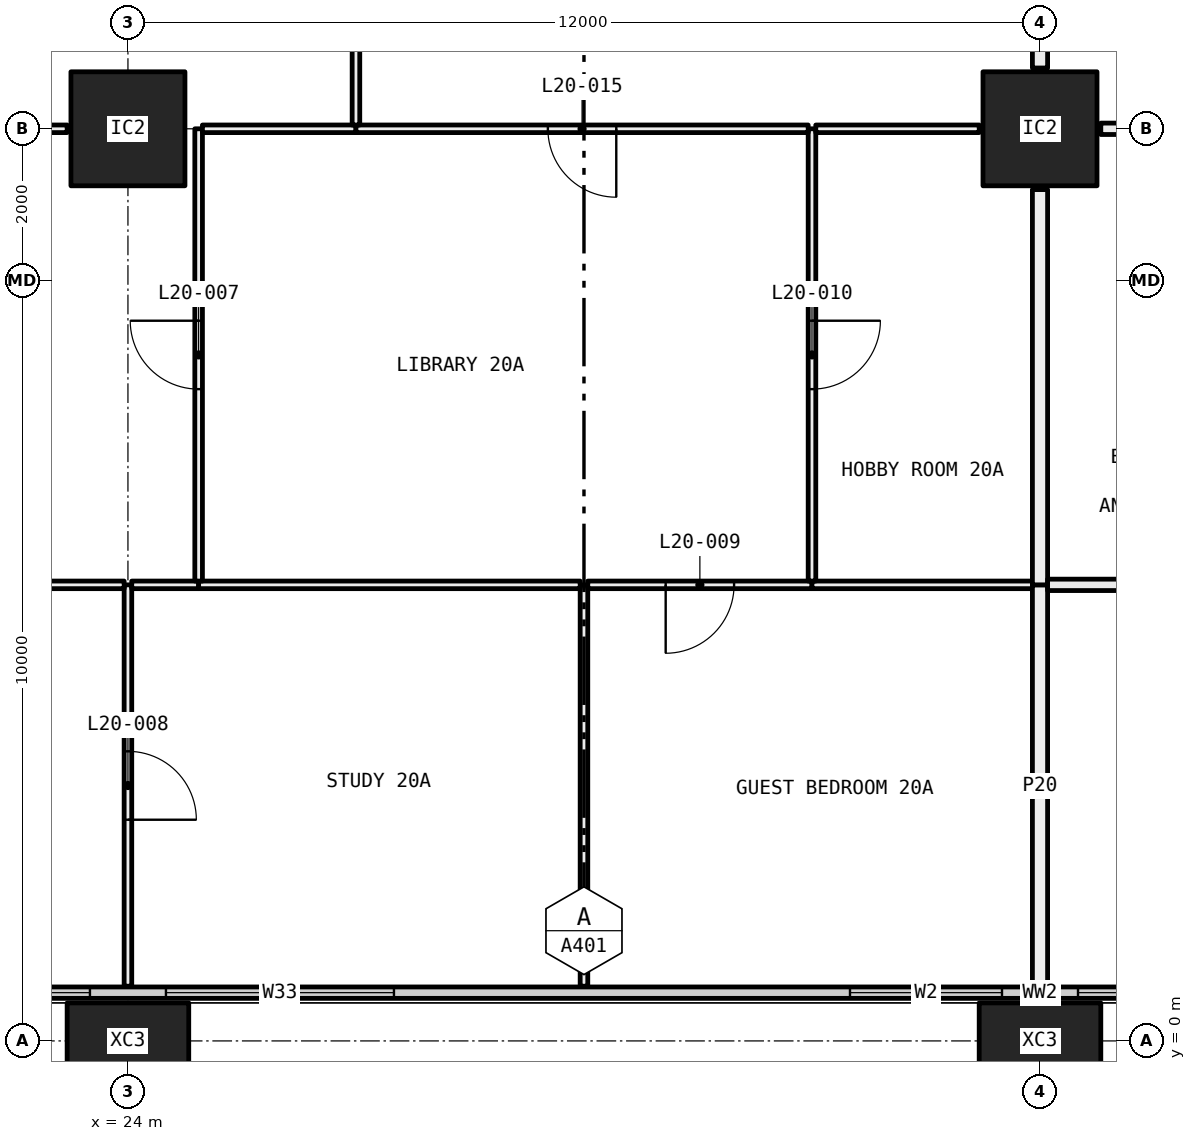
"""IFC4 building model, lengths in metres.
Left out: names, types, materials, properties, quantities, classifications, styles, units other than length and angle.
Written with IfcOpenShell. Run it as: python <this file> out.ifc"""

import sys

from ifc_helpers import new_model, si_unit, direction, frame, frame_2d, origin, origin_2d, place, context, subcontext, project, spatial, rectangle, hollow_rectangle, extrude, element, fill, save


model = new_model("IFC4")
c1 = context("Model", 3, precision=1e-05, world=origin(), true_north=direction((0.0, 1.0)))
c2 = subcontext(c1, "Body", "Model", "MODEL_VIEW")
j1 = project(units=[si_unit("LENGTHUNIT", "METRE"), si_unit("PLANEANGLEUNIT", "RADIAN")], contexts=[c1])
p1 = place(None, origin())
s1 = spatial("IfcSite", under=j1, at=p1, CompositionType="ELEMENT")
p2 = place(p1, origin())
s2 = spatial("IfcBuilding", under=s1, at=p2, CompositionType="ELEMENT")
p3 = place(p2, frame((0.0, 0.0, 81.75)))
s3 = spatial("IfcBuildingStorey", under=s2, at=p3, CompositionType="ELEMENT", Elevation=81.75)
p4 = place(p3, frame((24.0, 0.0, -0.4), z_axis=(0.0, 0.0, 1.0), x_axis=(1.0, 0.0, 0.0)))
e1 = element("IfcColumn", 1, at=p4, inside=s3, PredefinedType="COLUMN", context=c2, shape_type="SweptSolid", body=[
    extrude(hollow_rectangle(XDim=1.6, YDim=1.0, WallThickness=0.065, at=origin_2d()), origin(), (0.0, 0.0, 1.0), 3.45),
])
p5 = place(p3, frame((24.0, 12.0, 0.0), z_axis=(0.0, 0.0, 1.0), x_axis=(1.0, 0.0, 0.0)))
e2 = element("IfcColumn", 2, at=p5, inside=s3, PredefinedType="COLUMN", context=c2, shape_type="SweptSolid", body=[
    extrude(hollow_rectangle(XDim=1.5, YDim=1.5, WallThickness=0.065, at=origin_2d()), origin(), (0.0, 0.0, 1.0), 3.05),
])
p6 = place(p3, frame((36.0, 0.0, -0.4), z_axis=(0.0, 0.0, 1.0), x_axis=(1.0, 0.0, 0.0)))
e3 = element("IfcColumn", 3, at=p6, inside=s3, PredefinedType="COLUMN", context=c2, shape_type="SweptSolid", body=[
    extrude(hollow_rectangle(XDim=1.6, YDim=1.0, WallThickness=0.065, at=origin_2d()), origin(), (0.0, 0.0, 1.0), 3.45),
])
p7 = place(p3, frame((36.0, 12.0, 0.0), z_axis=(0.0, 0.0, 1.0), x_axis=(1.0, 0.0, 0.0)))
e4 = element("IfcColumn", 4, at=p7, inside=s3, PredefinedType="COLUMN", context=c2, shape_type="SweptSolid", body=[
    extrude(hollow_rectangle(XDim=1.5, YDim=1.5, WallThickness=0.065, at=origin_2d()), origin(), (0.0, 0.0, 1.0), 3.05),
])
p8 = place(p3, frame((6.56, 0.635, 0.0), z_axis=(0.0, 0.0, 1.0), x_axis=(1.0, 0.0, 0.0)))
e5 = element("IfcWall", 5, at=p8, inside=s3, PredefinedType="ELEMENTEDWALL", context=c2, shape_type="SweptSolid", body=[
    extrude(rectangle(XDim=58.88, YDim=0.15, at=frame_2d((29.44, 0.0))), origin(), (0.0, 0.0, 1.0), 3.05),
])
p9 = place(p8, frame((0.44, 0.0, 0.45)))
e6 = element("IfcOpeningElement", 6, at=p9, cuts=e5, PredefinedType="OPENING", context=c2, shape_type="SweptSolid", body=[
    extrude(rectangle(XDim=4.5, YDim=2.55, at=frame_2d((2.25, 1.275))), frame((0.0, 0.085, 0.0), z_axis=(0.0, -1.0, 0.0), x_axis=(1.0, 0.0, 0.0)), (0.0, 0.0, 1.0), 0.17),
])
p10 = place(p8, frame((5.94, 0.0, 0.45)))
e7 = element("IfcOpeningElement", 7, at=p10, cuts=e5, PredefinedType="OPENING", context=c2, shape_type="SweptSolid", body=[
    extrude(rectangle(XDim=3.0, YDim=2.55, at=frame_2d((1.5, 1.275))), frame((0.0, 0.085, 0.0), z_axis=(0.0, -1.0, 0.0), x_axis=(1.0, 0.0, 0.0)), (0.0, 0.0, 1.0), 0.17),
])
p11 = place(p8, frame((13.94, 0.0, 0.45)))
e8 = element("IfcOpeningElement", 8, at=p11, cuts=e5, PredefinedType="OPENING", context=c2, shape_type="SweptSolid", body=[
    extrude(rectangle(XDim=3.0, YDim=2.55, at=frame_2d((1.5, 1.275))), frame((0.0, 0.085, 0.0), z_axis=(0.0, -1.0, 0.0), x_axis=(1.0, 0.0, 0.0)), (0.0, 0.0, 1.0), 0.17),
])
p12 = place(p8, frame((17.94, 0.0, 0.45)))
e9 = element("IfcOpeningElement", 9, at=p12, cuts=e5, PredefinedType="OPENING", context=c2, shape_type="SweptSolid", body=[
    extrude(rectangle(XDim=3.0, YDim=2.55, at=frame_2d((1.5, 1.275))), frame((0.0, 0.085, 0.0), z_axis=(0.0, -1.0, 0.0), x_axis=(1.0, 0.0, 0.0)), (0.0, 0.0, 1.0), 0.17),
])
p13 = place(p8, frame((26.94, 0.0, 0.45)))
e10 = element("IfcOpeningElement", 10, at=p13, cuts=e5, PredefinedType="OPENING", context=c2, shape_type="SweptSolid", body=[
    extrude(rectangle(XDim=2.0, YDim=2.55, at=frame_2d((1.0, 1.275))), frame((0.0, 0.085, 0.0), z_axis=(0.0, -1.0, 0.0), x_axis=(1.0, 0.0, 0.0)), (0.0, 0.0, 1.0), 0.17),
])
p14 = place(p8, frame((29.94, 0.0, 0.45)))
e11 = element("IfcOpeningElement", 11, at=p14, cuts=e5, PredefinedType="OPENING", context=c2, shape_type="SweptSolid", body=[
    extrude(rectangle(XDim=3.0, YDim=2.55, at=frame_2d((1.5, 1.275))), frame((0.0, 0.085, 0.0), z_axis=(0.0, -1.0, 0.0), x_axis=(1.0, 0.0, 0.0)), (0.0, 0.0, 1.0), 0.17),
])
p15 = place(p8, frame((37.94, 0.0, 0.45)))
e12 = element("IfcOpeningElement", 12, at=p15, cuts=e5, PredefinedType="OPENING", context=c2, shape_type="SweptSolid", body=[
    extrude(rectangle(XDim=3.0, YDim=2.55, at=frame_2d((1.5, 1.275))), frame((0.0, 0.085, 0.0), z_axis=(0.0, -1.0, 0.0), x_axis=(1.0, 0.0, 0.0)), (0.0, 0.0, 1.0), 0.17),
])
p16 = place(p8, frame((41.94, 0.0, 0.45)))
e13 = element("IfcOpeningElement", 13, at=p16, cuts=e5, PredefinedType="OPENING", context=c2, shape_type="SweptSolid", body=[
    extrude(rectangle(XDim=3.0, YDim=2.55, at=frame_2d((1.5, 1.275))), frame((0.0, 0.085, 0.0), z_axis=(0.0, -1.0, 0.0), x_axis=(1.0, 0.0, 0.0)), (0.0, 0.0, 1.0), 0.17),
])
p17 = place(p8, frame((50.94, 0.0, 0.45)))
e14 = element("IfcOpeningElement", 14, at=p17, cuts=e5, PredefinedType="OPENING", context=c2, shape_type="SweptSolid", body=[
    extrude(rectangle(XDim=2.0, YDim=2.55, at=frame_2d((1.0, 1.275))), frame((0.0, 0.085, 0.0), z_axis=(0.0, -1.0, 0.0), x_axis=(1.0, 0.0, 0.0)), (0.0, 0.0, 1.0), 0.17),
])
p18 = place(p8, frame((53.94, 0.0, 0.45)))
e15 = element("IfcOpeningElement", 15, at=p18, cuts=e5, PredefinedType="OPENING", context=c2, shape_type="SweptSolid", body=[
    extrude(rectangle(XDim=4.5, YDim=2.55, at=frame_2d((2.25, 1.275))), frame((0.0, 0.085, 0.0), z_axis=(0.0, -1.0, 0.0), x_axis=(1.0, 0.0, 0.0)), (0.0, 0.0, 1.0), 0.17),
])
p19 = place(p3, frame((24.0, 0.72, 0.0), z_axis=(0.0, 0.0, 1.0), x_axis=(0.0, 1.0, 0.0)))
e16 = element("IfcWall", 16, at=p19, inside=s3, PredefinedType="PARTITIONING", context=c2, shape_type="SweptSolid", body=[
    extrude(rectangle(XDim=5.28, YDim=0.1, at=frame_2d((2.64, 0.0))), origin(), (0.0, 0.0, 1.0), 2.45),
])
p20 = place(p19, frame((2.19, 0.0, 0.0)))
e17 = element("IfcOpeningElement", 17, at=p20, cuts=e16, PredefinedType="OPENING", context=c2, shape_type="SweptSolid", body=[
    extrude(rectangle(XDim=0.9, YDim=2.1, at=frame_2d((0.45, 1.05))), frame((0.0, 0.06, 0.0), z_axis=(0.0, -1.0, 0.0), x_axis=(1.0, 0.0, 0.0)), (0.0, 0.0, 1.0), 0.12),
])
p21 = place(p3, frame((23.95, 6.0, 0.0), z_axis=(0.0, 0.0, 1.0), x_axis=(-1.0, 0.0, 0.0)))
e18 = element("IfcWall", 18, at=p21, inside=s3, PredefinedType="PARTITIONING", context=c2, shape_type="SweptSolid", body=[
    extrude(rectangle(XDim=7.09, YDim=0.1, at=frame_2d((3.545, 0.0))), origin(), (0.0, 0.0, 1.0), 2.45),
])
p22 = place(p3, frame((30.0, 0.72, 0.0), z_axis=(0.0, 0.0, 1.0), x_axis=(0.0, 1.0, 0.0)))
e19 = element("IfcWall", 19, at=p22, inside=s3, PredefinedType="PARTITIONING", context=c2, shape_type="SweptSolid", body=[
    extrude(rectangle(XDim=5.28, YDim=0.1, at=frame_2d((2.64, 0.0))), origin(), (0.0, 0.0, 1.0), 3.05),
])
p23 = place(p3, frame((24.93, 6.0, 0.0), z_axis=(0.0, 0.0, 1.0), x_axis=(-1.0, 0.0, 0.0)))
e20 = element("IfcWall", 20, at=p23, inside=s3, PredefinedType="PARTITIONING", context=c2, shape_type="SweptSolid", body=[
    extrude(rectangle(XDim=0.88, YDim=0.1, at=frame_2d((0.44, 0.0))), origin(), (0.0, 0.0, 1.0), 2.45),
])
p24 = place(p3, frame((29.95, 6.0, 0.0), z_axis=(0.0, 0.0, 1.0), x_axis=(-1.0, 0.0, 0.0)))
e21 = element("IfcWall", 21, at=p24, inside=s3, PredefinedType="PARTITIONING", context=c2, shape_type="SweptSolid", body=[
    extrude(rectangle(XDim=5.02, YDim=0.1, at=frame_2d((2.51, 0.0))), origin(), (0.0, 0.0, 1.0), 3.05),
])
p25 = place(p3, frame((33.0, 6.0, 0.0), z_axis=(0.0, 0.0, 1.0), x_axis=(-1.0, 0.0, 0.0)))
e22 = element("IfcWall", 22, at=p25, inside=s3, PredefinedType="PARTITIONING", context=c2, shape_type="SweptSolid", body=[
    extrude(rectangle(XDim=2.95, YDim=0.1, at=frame_2d((1.475, 0.0))), origin(), (0.0, 0.0, 1.0), 3.05),
])
p26 = place(p25, frame((1.025, 0.0, 0.0)))
e23 = element("IfcOpeningElement", 23, at=p26, cuts=e22, PredefinedType="OPENING", context=c2, shape_type="SweptSolid", body=[
    extrude(rectangle(XDim=0.9, YDim=2.1, at=frame_2d((0.45, 1.05))), frame((0.0, 0.06, 0.0), z_axis=(0.0, -1.0, 0.0), x_axis=(1.0, 0.0, 0.0)), (0.0, 0.0, 1.0), 0.12),
])
p27 = place(p3, frame((35.9, 6.0, 0.0), z_axis=(0.0, 0.0, 1.0), x_axis=(-1.0, 0.0, 0.0)))
e24 = element("IfcWall", 24, at=p27, inside=s3, PredefinedType="PARTITIONING", context=c2, shape_type="SweptSolid", body=[
    extrude(rectangle(XDim=2.9, YDim=0.1, at=frame_2d((1.45, 0.0))), origin(), (0.0, 0.0, 1.0), 3.05),
])
p28 = place(p3, frame((36.0, 0.72, 0.0), z_axis=(0.0, 0.0, 1.0), x_axis=(0.0, 1.0, 0.0)))
e25 = element("IfcWall", 25, at=p28, inside=s3, PredefinedType="PARTITIONING", context=c2, shape_type="SweptSolid", body=[
    extrude(rectangle(XDim=5.28, YDim=0.2, at=frame_2d((2.64, 0.0))), origin(), (0.0, 0.0, 1.0), 2.45),
])
p29 = place(p3, frame((24.93, 6.05, 0.0), z_axis=(0.0, 0.0, 1.0), x_axis=(0.0, 1.0, 0.0)))
e26 = element("IfcWall", 26, at=p29, inside=s3, PredefinedType="PARTITIONING", context=c2, shape_type="SweptSolid", body=[
    extrude(rectangle(XDim=5.95, YDim=0.1, at=frame_2d((2.975, 0.0))), origin(), (0.0, 0.0, 1.0), 2.45),
])
p30 = place(p29, frame((2.525, 0.0, 0.0)))
e27 = element("IfcOpeningElement", 27, at=p30, cuts=e26, PredefinedType="OPENING", context=c2, shape_type="SweptSolid", body=[
    extrude(rectangle(XDim=0.9, YDim=2.1, at=frame_2d((0.45, 1.05))), frame((0.0, 0.06, 0.0), z_axis=(0.0, -1.0, 0.0), x_axis=(1.0, 0.0, 0.0)), (0.0, 0.0, 1.0), 0.12),
])
p31 = place(p3, frame((23.2, 12.0, 0.0), z_axis=(0.0, 0.0, 1.0), x_axis=(-1.0, 0.0, 0.0)))
e28 = element("IfcWall", 28, at=p31, inside=s3, PredefinedType="PARTITIONING", context=c2, shape_type="SweptSolid", body=[
    extrude(rectangle(XDim=3.7, YDim=0.1, at=frame_2d((1.85, 0.0))), origin(), (0.0, 0.0, 1.0), 2.45),
])
p32 = place(p3, frame((33.0, 6.05, 0.0), z_axis=(0.0, 0.0, 1.0), x_axis=(0.0, 1.0, 0.0)))
e29 = element("IfcWall", 29, at=p32, inside=s3, PredefinedType="PARTITIONING", context=c2, shape_type="SweptSolid", body=[
    extrude(rectangle(XDim=5.95, YDim=0.1, at=frame_2d((2.975, 0.0))), origin(), (0.0, 0.0, 1.0), 2.45),
])
p33 = place(p32, frame((2.525, 0.0, 0.0)))
e30 = element("IfcOpeningElement", 30, at=p33, cuts=e29, PredefinedType="OPENING", context=c2, shape_type="SweptSolid", body=[
    extrude(rectangle(XDim=0.9, YDim=2.1, at=frame_2d((0.45, 1.05))), frame((0.0, 0.06, 0.0), z_axis=(0.0, -1.0, 0.0), x_axis=(1.0, 0.0, 0.0)), (0.0, 0.0, 1.0), 0.12),
])
p34 = place(p3, frame((27.0, 12.0, 0.0), z_axis=(0.0, 0.0, 1.0), x_axis=(-1.0, 0.0, 0.0)))
e31 = element("IfcWall", 31, at=p34, inside=s3, PredefinedType="PARTITIONING", context=c2, shape_type="SweptSolid", body=[
    extrude(rectangle(XDim=2.02, YDim=0.1, at=frame_2d((1.01, 0.0))), origin(), (0.0, 0.0, 1.0), 2.45),
])
p35 = place(p3, frame((32.95, 12.0, 0.0), z_axis=(0.0, 0.0, 1.0), x_axis=(-1.0, 0.0, 0.0)))
e32 = element("IfcWall", 32, at=p35, inside=s3, PredefinedType="PARTITIONING", context=c2, shape_type="SweptSolid", body=[
    extrude(rectangle(XDim=5.95, YDim=0.1, at=frame_2d((2.975, 0.0))), origin(), (0.0, 0.0, 1.0), 2.45),
])
p36 = place(p35, frame((2.525, 0.0, 0.0)))
e33 = element("IfcOpeningElement", 33, at=p36, cuts=e32, PredefinedType="OPENING", context=c2, shape_type="SweptSolid", body=[
    extrude(rectangle(XDim=0.9, YDim=2.1, at=frame_2d((0.45, 1.05))), frame((0.0, 0.06, 0.0), z_axis=(0.0, -1.0, 0.0), x_axis=(1.0, 0.0, 0.0)), (0.0, 0.0, 1.0), 0.12),
])
p37 = place(p3, frame((35.2, 12.0, 0.0), z_axis=(0.0, 0.0, 1.0), x_axis=(-1.0, 0.0, 0.0)))
e34 = element("IfcWall", 34, at=p37, inside=s3, PredefinedType="PARTITIONING", context=c2, shape_type="SweptSolid", body=[
    extrude(rectangle(XDim=2.15, YDim=0.1, at=frame_2d((1.075, 0.0))), origin(), (0.0, 0.0, 1.0), 2.45),
])
p38 = place(p3, frame((36.0, 6.0, 0.0), z_axis=(0.0, 0.0, 1.0), x_axis=(0.0, 1.0, 0.0)))
e35 = element("IfcWall", 35, at=p38, inside=s3, PredefinedType="PARTITIONING", context=c2, shape_type="SweptSolid", body=[
    extrude(rectangle(XDim=5.2, YDim=0.2, at=frame_2d((2.6, 0.0))), origin(), (0.0, 0.0, 1.0), 2.45),
])
p39 = place(p3, frame((27.0, 12.05, 0.0), z_axis=(0.0, 0.0, 1.0), x_axis=(0.0, 1.0, 0.0)))
e36 = element("IfcWall", 36, at=p39, inside=s3, PredefinedType="PARTITIONING", context=c2, shape_type="SweptSolid", body=[
    extrude(rectangle(XDim=5.95, YDim=0.1, at=frame_2d((2.975, 0.0))), origin(), (0.0, 0.0, 1.0), 2.45),
])
p40 = place(p3, frame((36.0, 12.8, 0.0), z_axis=(0.0, 0.0, 1.0), x_axis=(0.0, 1.0, 0.0)))
e37 = element("IfcWall", 37, at=p40, inside=s3, PredefinedType="PARTITIONING", context=c2, shape_type="SweptSolid", body=[
    extrude(rectangle(XDim=5.2, YDim=0.2, at=frame_2d((2.6, 0.0))), origin(), (0.0, 0.0, 1.0), 2.45),
])
p41 = place(p3, frame((39.0, 6.0, 0.0), z_axis=(0.0, 0.0, 1.0), x_axis=(-1.0, 0.0, 0.0)))
e38 = element("IfcWall", 38, at=p41, inside=s3, PredefinedType="PARTITIONING", context=c2, shape_type="SweptSolid", body=[
    extrude(rectangle(XDim=2.9, YDim=0.15, at=frame_2d((1.45, 0.0))), origin(), (0.0, 0.0, 1.0), 3.05),
])
p42 = place(p3, frame((38.925, 12.0, 0.0), z_axis=(0.0, 0.0, 1.0), x_axis=(-1.0, 0.0, 0.0)))
e39 = element("IfcWall", 39, at=p42, inside=s3, PredefinedType="PARTITIONING", context=c2, shape_type="SweptSolid", body=[
    extrude(rectangle(XDim=2.125, YDim=0.15, at=frame_2d((1.062, 0.0))), origin(), (0.0, 0.0, 1.0), 2.45),
])
p43 = place(p11, origin())
e40 = element("IfcWindow", 40, at=p43, inside=s3, PartitioningType="SINGLE_PANEL", PredefinedType="WINDOW", context=c2, shape_type="SweptSolid", body=[
    extrude(rectangle(XDim=3.0, YDim=2.55, at=frame_2d((1.5, 1.275))), frame((0.0, 0.03, 0.0), z_axis=(0.0, -1.0, 0.0), x_axis=(1.0, 0.0, 0.0)), (0.0, 0.0, 1.0), 0.06),
])
fill(e8, e40)
p44 = place(p12, origin())
e41 = element("IfcWindow", 41, at=p44, inside=s3, PartitioningType="SINGLE_PANEL", PredefinedType="WINDOW", context=c2, shape_type="SweptSolid", body=[
    extrude(rectangle(XDim=3.0, YDim=2.55, at=frame_2d((1.5, 1.275))), frame((0.0, 0.03, 0.0), z_axis=(0.0, -1.0, 0.0), x_axis=(1.0, 0.0, 0.0)), (0.0, 0.0, 1.0), 0.06),
])
fill(e9, e41)
p45 = place(p13, origin())
e42 = element("IfcWindow", 42, at=p45, inside=s3, PartitioningType="SINGLE_PANEL", PredefinedType="WINDOW", context=c2, shape_type="SweptSolid", body=[
    extrude(rectangle(XDim=2.0, YDim=2.55, at=frame_2d((1.0, 1.275))), frame((0.0, 0.03, 0.0), z_axis=(0.0, -1.0, 0.0), x_axis=(1.0, 0.0, 0.0)), (0.0, 0.0, 1.0), 0.06),
])
fill(e10, e42)
p46 = place(p14, origin())
e43 = element("IfcWindow", 43, at=p46, inside=s3, PartitioningType="SINGLE_PANEL", PredefinedType="WINDOW", context=c2, shape_type="SweptSolid", body=[
    extrude(rectangle(XDim=3.0, YDim=2.55, at=frame_2d((1.5, 1.275))), frame((0.0, 0.03, 0.0), z_axis=(0.0, -1.0, 0.0), x_axis=(1.0, 0.0, 0.0)), (0.0, 0.0, 1.0), 0.06),
])
fill(e11, e43)
p47 = place(p30, origin())
e44 = element("IfcDoor", 44, at=p47, inside=s3, OperationType="SINGLE_SWING_LEFT", PredefinedType="DOOR", context=c2, shape_type="SweptSolid", body=[
    extrude(rectangle(XDim=0.9, YDim=2.1, at=frame_2d((0.45, 1.05))), frame((0.0, 0.025, 0.0), z_axis=(0.0, -1.0, 0.0), x_axis=(1.0, 0.0, 0.0)), (0.0, 0.0, 1.0), 0.05),
])
fill(e27, e44)
p48 = place(p20, frame((0.9, 0.0, 0.0), x_axis=(-1.0, 0.0, 0.0)))
e45 = element("IfcDoor", 45, at=p48, inside=s3, OperationType="SINGLE_SWING_LEFT", PredefinedType="DOOR", context=c2, shape_type="SweptSolid", body=[
    extrude(rectangle(XDim=0.9, YDim=2.1, at=frame_2d((0.45, 1.05))), frame((0.0, 0.025, 0.0), z_axis=(0.0, -1.0, 0.0), x_axis=(1.0, 0.0, 0.0)), (0.0, 0.0, 1.0), 0.05),
])
fill(e17, e45)
p49 = place(p26, origin())
e46 = element("IfcDoor", 46, at=p49, inside=s3, OperationType="SINGLE_SWING_LEFT", PredefinedType="DOOR", context=c2, shape_type="SweptSolid", body=[
    extrude(rectangle(XDim=0.9, YDim=2.1, at=frame_2d((0.45, 1.05))), frame((0.0, 0.025, 0.0), z_axis=(0.0, -1.0, 0.0), x_axis=(1.0, 0.0, 0.0)), (0.0, 0.0, 1.0), 0.05),
])
fill(e23, e46)
p50 = place(p33, frame((0.9, 0.0, 0.0), x_axis=(-1.0, 0.0, 0.0)))
e47 = element("IfcDoor", 47, at=p50, inside=s3, OperationType="SINGLE_SWING_RIGHT", PredefinedType="DOOR", context=c2, shape_type="SweptSolid", body=[
    extrude(rectangle(XDim=0.9, YDim=2.1, at=frame_2d((0.45, 1.05))), frame((0.0, 0.025, 0.0), z_axis=(0.0, -1.0, 0.0), x_axis=(1.0, 0.0, 0.0)), (0.0, 0.0, 1.0), 0.05),
])
fill(e30, e47)
p51 = place(p36, origin())
e48 = element("IfcDoor", 48, at=p51, inside=s3, OperationType="SINGLE_SWING_RIGHT", PredefinedType="DOOR", context=c2, shape_type="SweptSolid", body=[
    extrude(rectangle(XDim=0.9, YDim=2.1, at=frame_2d((0.45, 1.05))), frame((0.0, 0.025, 0.0), z_axis=(0.0, -1.0, 0.0), x_axis=(1.0, 0.0, 0.0)), (0.0, 0.0, 1.0), 0.05),
])
fill(e33, e48)
save(model, sys.argv[1])
